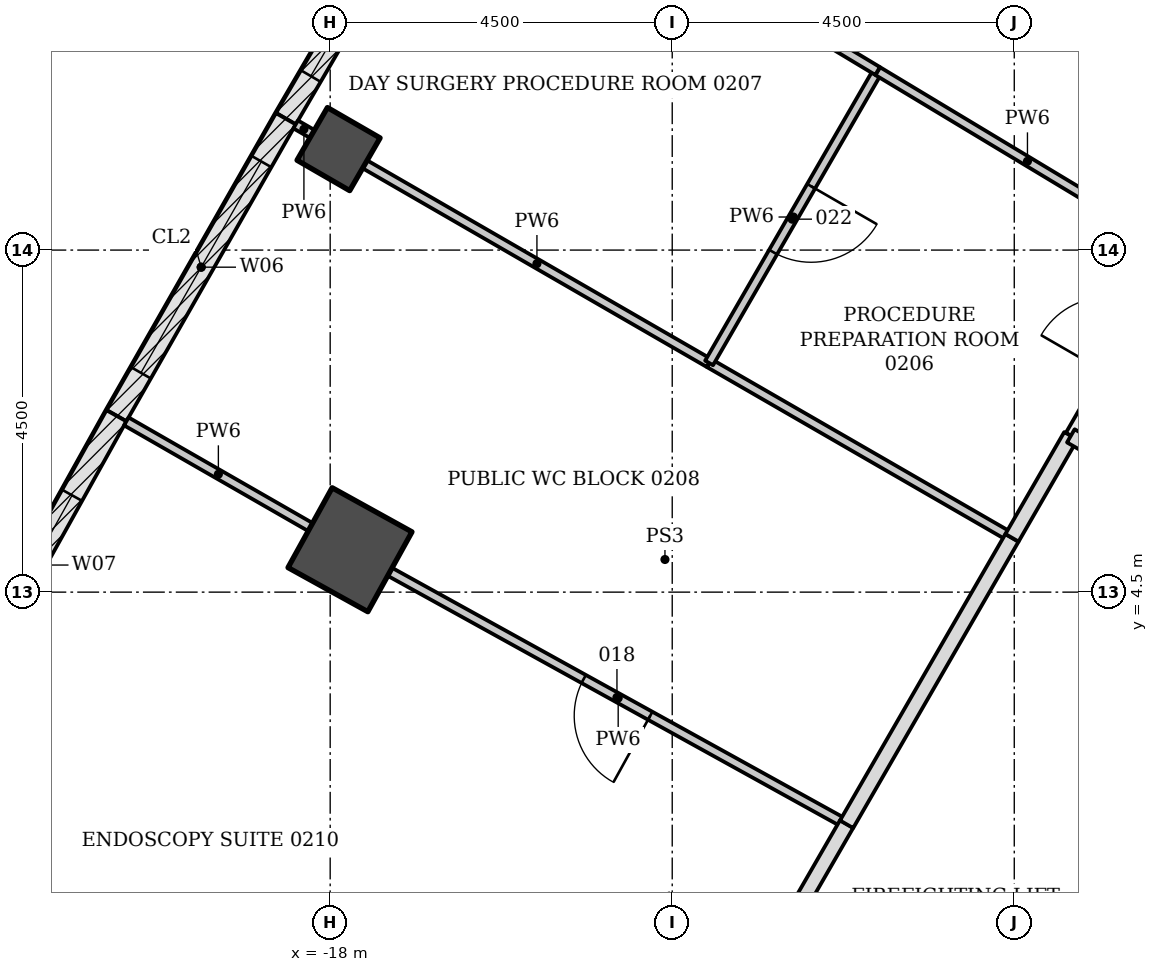
"""IFC4 building model, lengths in metres.
Left out: names, types, materials, properties, quantities, classifications, styles, units other than length and angle.
Written with IfcOpenShell. Run it as: python <this file> out.ifc"""

import sys

from ifc_helpers import new_model, si_unit, direction, frame, frame_2d, origin, origin_2d, place, context, subcontext, project, spatial, rectangle, extrude, element, fill, save


model = new_model("IFC4")
c1 = context("Model", 3, precision=1e-05, world=origin(), true_north=direction((0.0, 1.0)))
c2 = subcontext(c1, "Body", "Model", "MODEL_VIEW")
j1 = project(units=[si_unit("LENGTHUNIT", "METRE"), si_unit("PLANEANGLEUNIT", "RADIAN")], contexts=[c1])
p1 = place(None, origin())
s1 = spatial("IfcSite", under=j1, at=p1, CompositionType="ELEMENT")
p2 = place(p1, origin())
s2 = spatial("IfcBuilding", under=s1, at=p2, CompositionType="ELEMENT")
p3 = place(p2, frame((0.0, 0.0, 10.5)))
s3 = spatial("IfcBuildingStorey", under=s2, at=p3, CompositionType="ELEMENT", Elevation=10.5)
p4 = place(p3, frame((-17.739, 5.058, -0.25), z_axis=(0.0, 0.0, 1.0), x_axis=(-0.875152760281, 0.483846717641, 0.0)))
e1 = element("IfcColumn", 1, at=p4, inside=s3, PredefinedType="COLUMN", context=c2, shape_type="SweptSolid", body=[
    extrude(rectangle(XDim=1.2, YDim=1.2, at=origin_2d()), origin(), (0.0, 0.0, 1.0), 4.5),
])
p5 = place(p3, frame((-17.89, 10.329, -0.25), z_axis=(0.0, 0.0, 1.0), x_axis=(-0.866025403784, 0.5, 0.0)))
e2 = element("IfcColumn", 2, at=p5, inside=s3, PredefinedType="COLUMN", context=c2, shape_type="SweptSolid", body=[
    extrude(rectangle(XDim=0.8, YDim=0.8, at=origin_2d()), origin(), (0.0, 0.0, 1.0), 4.5),
])
p6 = place(p3, frame((-1.083, 11.281, -0.25), z_axis=(0.0, 0.0, 1.0), x_axis=(-0.500001446645, -0.866024568562, 0.0)))
e3 = element("IfcWall", 3, at=p6, inside=s3, PredefinedType="SHEAR", context=c2, shape_type="SweptSolid", body=[
    extrude(rectangle(XDim=18.458, YDim=0.7, at=frame_2d((9.229, 0.0))), origin(), (0.0, 0.0, 1.0), 4.5),
])
p7 = place(p6, frame((8.979, 0.0, 0.25)))
e4 = element("IfcOpeningElement", 4, at=p7, cuts=e3, PredefinedType="OPENING", context=c2, shape_type="SweptSolid", body=[
    extrude(rectangle(XDim=1.2, YDim=2.1, at=frame_2d((0.6, 1.05))), frame((0.0, 0.36, 0.0), z_axis=(0.0, -1.0, 0.0), x_axis=(1.0, 0.0, 0.0)), (0.0, 0.0, 1.0), 0.72),
])
p8 = place(p6, frame((11.029, 0.0, 0.25)))
e5 = element("IfcOpeningElement", 5, at=p8, cuts=e3, PredefinedType="OPENING", context=c2, shape_type="SweptSolid", body=[
    extrude(rectangle(XDim=1.2, YDim=2.1, at=frame_2d((0.6, 1.05))), frame((0.0, 0.36, 0.0), z_axis=(0.0, -1.0, 0.0), x_axis=(1.0, 0.0, 0.0)), (0.0, 0.0, 1.0), 0.72),
])
p9 = place(p3, frame((-18.582, 10.73, 0.0), z_axis=(0.0, 0.0, 1.0), x_axis=(0.50445499627, 0.86343798662, 0.0)))
e6 = element("IfcWall", 6, at=p9, inside=s3, PredefinedType="NOTDEFINED", context=c2, shape_type="SweptSolid", body=[
    extrude(rectangle(XDim=4.496, YDim=0.3, at=frame_2d((2.248, 0.0))), origin(), (0.0, 0.0, 1.0), 4.25),
])
p10 = place(p9, frame((0.648, 0.0, 0.8)))
e7 = element("IfcOpeningElement", 7, at=p10, cuts=e6, PredefinedType="OPENING", context=c2, shape_type="SweptSolid", body=[
    extrude(rectangle(XDim=3.2, YDim=2.7, at=frame_2d((1.6, 1.35))), frame((0.0, 0.16, 0.0), z_axis=(0.0, -1.0, 0.0), x_axis=(1.0, 0.0, 0.0)), (0.0, 0.0, 1.0), 0.32),
])
p11 = place(p3, frame((-20.811, 6.823, 0.0), z_axis=(0.0, 0.0, 1.0), x_axis=(0.495524760411, 0.868593812907, 0.0)))
e8 = element("IfcWall", 8, at=p11, inside=s3, PredefinedType="NOTDEFINED", context=c2, shape_type="SweptSolid", body=[
    extrude(rectangle(XDim=4.496, YDim=0.3, at=frame_2d((2.248, 0.0))), origin(), (0.0, 0.0, 1.0), 4.25),
])
p12 = place(p11, frame((0.648, 0.0, 0.8)))
e9 = element("IfcOpeningElement", 9, at=p12, cuts=e8, PredefinedType="OPENING", context=c2, shape_type="SweptSolid", body=[
    extrude(rectangle(XDim=3.2, YDim=2.7, at=frame_2d((1.6, 1.35))), frame((0.0, 0.16, 0.0), z_axis=(0.0, -1.0, 0.0), x_axis=(1.0, 0.0, 0.0)), (0.0, 0.0, 1.0), 0.32),
])
p13 = place(p3, frame((-23.0, 2.893, 0.0), z_axis=(0.0, 0.0, 1.0), x_axis=(0.486606252415, 0.873621402617, 0.0)))
e10 = element("IfcWall", 10, at=p13, inside=s3, PredefinedType="NOTDEFINED", context=c2, shape_type="SweptSolid", body=[
    extrude(rectangle(XDim=4.496, YDim=0.3, at=frame_2d((2.248, 0.0))), origin(), (0.0, 0.0, 1.0), 4.25),
])
p14 = place(p13, frame((1.198, 0.0, 0.8)))
e11 = element("IfcOpeningElement", 11, at=p14, cuts=e10, PredefinedType="OPENING", context=c2, shape_type="SweptSolid", body=[
    extrude(rectangle(XDim=2.1, YDim=3.0, at=frame_2d((1.05, 1.5))), frame((0.0, 0.16, 0.0), z_axis=(0.0, -1.0, 0.0), x_axis=(1.0, 0.0, 0.0)), (0.0, 0.0, 1.0), 0.32),
])
p15 = place(p3, frame((-12.635, -1.028, 0.0), z_axis=(0.0, 0.0, 1.0), x_axis=(0.499801250411, 0.866140121509, 0.0)))
e12 = element("IfcWall", 12, at=p15, inside=s3, PredefinedType="PARTITIONING", context=c2, shape_type="SweptSolid", body=[
    extrude(rectangle(XDim=2.861, YDim=0.2, at=frame_2d((1.431, 0.0))), origin(), (0.0, 0.0, 1.0), 3.638),
])
p16 = place(p3, frame((-18.26, 5.356, 0.0), z_axis=(0.0, 0.0, 1.0), x_axis=(-0.867283853893, 0.49781393791, 0.0)))
e13 = element("IfcWall", 13, at=p16, inside=s3, PredefinedType="PARTITIONING", context=c2, shape_type="SweptSolid", body=[
    extrude(rectangle(XDim=2.792, YDim=0.12, at=frame_2d((1.396, 0.0))), origin(), (0.0, 0.0, 1.0), 3.633),
])
p17 = place(p3, frame((-11.208, 1.446, 0.0), z_axis=(0.0, 0.0, 1.0), x_axis=(-0.875125393946, 0.483896212912, 0.0)))
e14 = element("IfcWall", 14, at=p17, inside=s3, PredefinedType="PARTITIONING", context=c2, shape_type="SweptSolid", body=[
    extrude(rectangle(XDim=6.863, YDim=0.12, at=frame_2d((3.432, 0.0))), origin(), (0.0, 0.0, 1.0), 3.638),
])
p18 = place(p17, frame((2.95, 0.0, 0.0)))
e15 = element("IfcOpeningElement", 15, at=p18, cuts=e14, PredefinedType="OPENING", context=c2, shape_type="SweptSolid", body=[
    extrude(rectangle(XDim=1.0, YDim=2.1, at=frame_2d((0.5, 1.05))), frame((0.0, 0.07, 0.0), z_axis=(0.0, -1.0, 0.0), x_axis=(1.0, 0.0, 0.0)), (0.0, 0.0, 1.0), 0.14),
])
p19 = place(p3, frame((-9.031, 5.213, 0.0), z_axis=(0.0, 0.0, 1.0), x_axis=(-0.500044734646, -0.865999574684, 0.0)))
e16 = element("IfcWall", 16, at=p19, inside=s3, PredefinedType="PARTITIONING", context=c2, shape_type="SweptSolid", body=[
    extrude(rectangle(XDim=4.35, YDim=0.2, at=frame_2d((2.175, 0.0))), origin(), (0.0, 0.0, 1.0), 3.638),
])
p20 = place(p3, frame((-8.256, 6.556, 0.0), z_axis=(0.0, 0.0, 1.0), x_axis=(-0.499904469662, -0.866080551226, 0.0)))
e17 = element("IfcWall", 17, at=p20, inside=s3, PredefinedType="PARTITIONING", context=c2, shape_type="SweptSolid", body=[
    extrude(rectangle(XDim=1.548, YDim=0.2, at=frame_2d((0.774, 0.0))), origin(), (0.0, 0.0, 1.0), 3.638),
])
p21 = place(p3, frame((-5.226, 4.806, 0.0), z_axis=(0.0, 0.0, 1.0), x_axis=(-0.865949687125, 0.500131122175, 0.0)))
e18 = element("IfcWall", 18, at=p21, inside=s3, PredefinedType="PARTITIONING", context=c2, shape_type="SweptSolid", body=[
    extrude(rectangle(XDim=3.499, YDim=0.2, at=frame_2d((1.75, 0.0))), origin(), (0.0, 0.0, 1.0), 4.25),
])
p22 = place(p21, frame((0.95, 0.0, 0.0)))
e19 = element("IfcOpeningElement", 19, at=p22, cuts=e18, PredefinedType="OPENING", context=c2, shape_type="SweptSolid", body=[
    extrude(rectangle(XDim=1.5, YDim=2.1, at=frame_2d((0.75, 1.05))), frame((0.0, 0.11, 0.0), z_axis=(0.0, -1.0, 0.0), x_axis=(1.0, 0.0, 0.0)), (0.0, 0.0, 1.0), 0.22),
])
p23 = place(p3, frame((-9.032, 5.215, 0.0), z_axis=(0.0, 0.0, 1.0), x_axis=(-0.866130767322, 0.499817460578, 0.0)))
e20 = element("IfcWall", 20, at=p23, inside=s3, PredefinedType="PARTITIONING", context=c2, shape_type="SweptSolid", body=[
    extrude(rectangle(XDim=4.597, YDim=0.12, at=frame_2d((2.299, 0.0))), origin(), (0.0, 0.0, 1.0), 3.638),
])
p24 = place(p3, frame((-18.237, 10.528, 0.0), z_axis=(0.0, 0.0, 1.0), x_axis=(-0.866558586415, 0.499075361355, 0.0)))
e21 = element("IfcWall", 21, at=p24, inside=s3, PredefinedType="PARTITIONING", context=c2, shape_type="SweptSolid", body=[
    extrude(rectangle(XDim=0.25, YDim=0.12, at=frame_2d((0.125, 0.0))), origin(), (0.0, 0.0, 1.0), 4.25),
])
p25 = place(p3, frame((-13.017, 7.515, 0.0), z_axis=(0.0, 0.0, 1.0), x_axis=(-0.866023771128, 0.500002827834, 0.0)))
e22 = element("IfcWall", 22, at=p25, inside=s3, PredefinedType="PARTITIONING", context=c2, shape_type="SweptSolid", body=[
    extrude(rectangle(XDim=5.226, YDim=0.12, at=frame_2d((2.613, 0.0))), origin(), (0.0, 0.0, 1.0), 3.638),
])
p26 = place(p3, frame((-10.797, 11.355, 0.0), z_axis=(0.0, 0.0, 1.0), x_axis=(-0.500117989508, -0.865957271793, 0.0)))
e23 = element("IfcWall", 23, at=p26, inside=s3, PredefinedType="PARTITIONING", context=c2, shape_type="SweptSolid", body=[
    extrude(rectangle(XDim=4.435, YDim=0.12, at=frame_2d((2.217, 0.0))), origin(), (0.0, 0.0, 1.0), 3.638),
])
p27 = place(p26, frame((1.75, 0.0, 0.0)))
e24 = element("IfcOpeningElement", 24, at=p27, cuts=e23, PredefinedType="OPENING", context=c2, shape_type="SweptSolid", body=[
    extrude(rectangle(XDim=1.0, YDim=2.1, at=frame_2d((0.5, 1.05))), frame((0.0, 0.07, 0.0), z_axis=(0.0, -1.0, 0.0), x_axis=(1.0, 0.0, 0.0)), (0.0, 0.0, 1.0), 0.14),
])
p28 = place(p3, frame((-6.857, 8.983, 0.0), z_axis=(0.0, 0.0, 1.0), x_axis=(-0.856751730158, 0.515729069251, 0.0)))
e25 = element("IfcWall", 25, at=p28, inside=s3, PredefinedType="PARTITIONING", context=c2, shape_type="SweptSolid", body=[
    extrude(rectangle(XDim=4.598, YDim=0.12, at=frame_2d((2.299, 0.0))), origin(), (0.0, 0.0, 1.0), 3.638),
])
p29 = place(p3, frame((-8.256, 6.558, 0.0), z_axis=(0.0, 0.0, 1.0), x_axis=(0.500081734942, 0.86597820895, 0.0)))
e26 = element("IfcWall", 26, at=p29, inside=s3, PredefinedType="PARTITIONING", context=c2, shape_type="SweptSolid", body=[
    extrude(rectangle(XDim=2.804, YDim=0.15, at=frame_2d((1.402, 0.0))), origin(), (0.0, 0.0, 1.0), 3.638),
])
p30 = place(p29, frame((0.95, 0.0, 0.0)))
e27 = element("IfcOpeningElement", 27, at=p30, cuts=e26, PredefinedType="OPENING", context=c2, shape_type="SweptSolid", body=[
    extrude(rectangle(XDim=1.0, YDim=2.1, at=frame_2d((0.5, 1.05))), frame((0.0, 0.085, 0.0), z_axis=(0.0, -1.0, 0.0), x_axis=(1.0, 0.0, 0.0)), (0.0, 0.0, 1.0), 0.17),
])
p31 = place(p3, frame((-10.798, 11.356, 0.0), z_axis=(0.0, 0.0, 1.0), x_axis=(-0.856627537291, 0.515935327686, 0.0)))
e28 = element("IfcWall", 28, at=p31, inside=s3, PredefinedType="PARTITIONING", context=c2, shape_type="SweptSolid", body=[
    extrude(rectangle(XDim=0.698, YDim=0.12, at=frame_2d((0.349, 0.0))), origin(), (0.0, 0.0, 1.0), 3.638),
])
p32 = place(p10, origin())
e29 = element("IfcWindow", 29, at=p32, inside=s3, PartitioningType="TRIPLE_PANEL_VERTICAL", PredefinedType="WINDOW", context=c2, shape_type="SweptSolid", body=[
    extrude(rectangle(XDim=3.2, YDim=2.7, at=frame_2d((1.6, 1.35))), frame((0.0, 0.03, 0.0), z_axis=(0.0, -1.0, 0.0), x_axis=(1.0, 0.0, 0.0)), (0.0, 0.0, 1.0), 0.06),
])
fill(e7, e29)
p33 = place(p12, origin())
e30 = element("IfcWindow", 30, at=p33, inside=s3, PartitioningType="TRIPLE_PANEL_VERTICAL", PredefinedType="WINDOW", context=c2, shape_type="SweptSolid", body=[
    extrude(rectangle(XDim=3.2, YDim=2.7, at=frame_2d((1.6, 1.35))), frame((0.0, 0.03, 0.0), z_axis=(0.0, -1.0, 0.0), x_axis=(1.0, 0.0, 0.0)), (0.0, 0.0, 1.0), 0.06),
])
fill(e9, e30)
p34 = place(p14, origin())
e31 = element("IfcWindow", 31, at=p34, inside=s3, PartitioningType="DOUBLE_PANEL_HORIZONTAL", PredefinedType="WINDOW", context=c2, shape_type="SweptSolid", body=[
    extrude(rectangle(XDim=2.1, YDim=3.0, at=frame_2d((1.05, 1.5))), frame((0.0, 0.03, 0.0), z_axis=(0.0, -1.0, 0.0), x_axis=(1.0, 0.0, 0.0)), (0.0, 0.0, 1.0), 0.06),
])
fill(e11, e31)
p35 = place(p18, origin())
e32 = element("IfcDoor", 32, at=p35, inside=s3, OperationType="SINGLE_SWING_LEFT", PredefinedType="DOOR", context=c2, shape_type="SweptSolid", body=[
    extrude(rectangle(XDim=1.0, YDim=2.1, at=frame_2d((0.5, 1.05))), frame((0.0, 0.025, 0.0), z_axis=(0.0, -1.0, 0.0), x_axis=(1.0, 0.0, 0.0)), (0.0, 0.0, 1.0), 0.05),
])
fill(e15, e32)
p36 = place(p27, origin())
e33 = element("IfcDoor", 33, at=p36, inside=s3, OperationType="SINGLE_SWING_LEFT", PredefinedType="DOOR", context=c2, shape_type="SweptSolid", body=[
    extrude(rectangle(XDim=1.0, YDim=2.1, at=frame_2d((0.5, 1.05))), frame((0.0, 0.025, 0.0), z_axis=(0.0, -1.0, 0.0), x_axis=(1.0, 0.0, 0.0)), (0.0, 0.0, 1.0), 0.05),
])
fill(e24, e33)
save(model, sys.argv[1])
